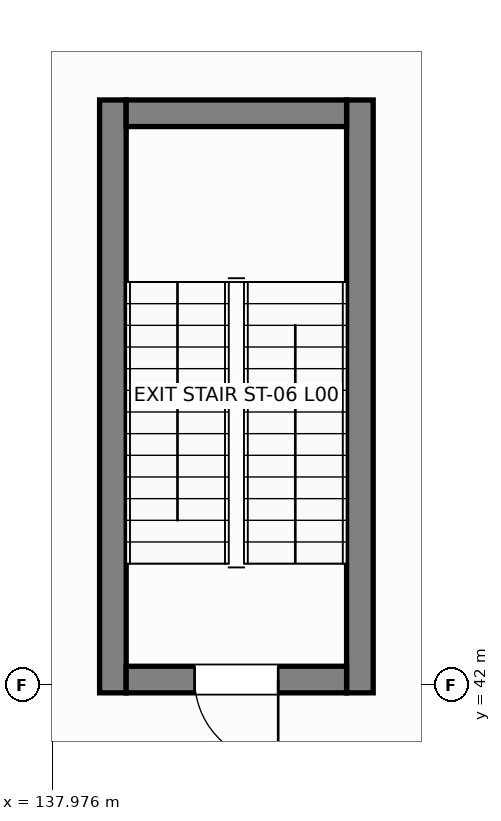
"""IFC4 building model, lengths in metres.
Left out: names, types, materials, properties, quantities, classifications, styles, units other than length and angle.
Written with IfcOpenShell. Run it as: python <this file> out.ifc"""

import sys

from ifc_helpers import new_model, si_unit, direction, frame, frame_2d, origin, place, context, subcontext, project, spatial, rectangle, extrude, element, fill, save


model = new_model("IFC4")
c1 = context("Model", 3, precision=1e-05, world=origin(), true_north=direction((0.0, 1.0)))
c2 = subcontext(c1, "Body", "Model", "MODEL_VIEW")
j1 = project(units=[si_unit("LENGTHUNIT", "METRE"), si_unit("PLANEANGLEUNIT", "RADIAN")], contexts=[c1])
p1 = place(None, origin())
s1 = spatial("IfcSite", under=j1, at=p1, CompositionType="ELEMENT")
p2 = place(p1, origin())
s2 = spatial("IfcBuilding", under=s1, at=p2, CompositionType="ELEMENT")
p3 = place(p2, origin())
s3 = spatial("IfcBuildingStorey", under=s2, at=p3, CompositionType="ELEMENT", Elevation=0.0)
for number, where, z_axis, x_axis in (
    (1, (138.775, 41.9, 0.0), (0.0, 0.0, 1.0), (0.0, 1.0, 0.0)),
    (2, (142.025, 41.9, 0.0), (0.0, 0.0, 1.0), (0.0, 1.0, 0.0)),
):
    element("IfcWall", number, at=place(p3, frame(where, z_axis=z_axis, x_axis=x_axis)), inside=s3, PredefinedType="SHEAR", context=c2, shape_type="SweptSolid", body=[
        extrude(rectangle(XDim=7.8, YDim=0.35, at=frame_2d((3.9, 0.0))), origin(), (0.0, 0.0, 1.0), 4.58),
    ])
p4 = place(p3, frame((138.95, 49.525, 0.0), z_axis=(0.0, 0.0, 1.0), x_axis=(1.0, 0.0, 0.0)))
e3 = element("IfcWall", 3, at=p4, inside=s3, PredefinedType="SHEAR", context=c2, shape_type="SweptSolid", body=[
    extrude(rectangle(XDim=2.9, YDim=0.35, at=frame_2d((1.45, 0.0))), origin(), (0.0, 0.0, 1.0), 4.58),
])
p5 = place(p3, frame((138.95, 42.075, 0.0), z_axis=(0.0, 0.0, 1.0), x_axis=(1.0, 0.0, 0.0)))
e4 = element("IfcWall", 4, at=p5, inside=s3, PredefinedType="SHEAR", context=c2, shape_type="SweptSolid", body=[
    extrude(rectangle(XDim=2.9, YDim=0.35, at=frame_2d((1.45, 0.0))), origin(), (0.0, 0.0, 1.0), 4.58),
])
p6 = place(p5, frame((0.9, 0.0, 0.0)))
e5 = element("IfcOpeningElement", 5, at=p6, cuts=e4, PredefinedType="OPENING", context=c2, shape_type="SweptSolid", body=[
    extrude(rectangle(XDim=1.1, YDim=2.15, at=frame_2d((0.55, 1.075))), frame((0.0, 0.185, 0.0), z_axis=(0.0, -1.0, 0.0), x_axis=(1.0, 0.0, 0.0)), (0.0, 0.0, 1.0), 0.37),
])
p7 = place(p6, frame((1.1, 0.0, 0.0), z_axis=(0.0, 0.0, 1.0), x_axis=(-1.0, 0.0, 0.0)))
e6 = element("IfcDoor", 6, at=p7, inside=s3, OperationType="SINGLE_SWING_LEFT", PredefinedType="DOOR", context=c2, shape_type="SweptSolid", body=[
    extrude(rectangle(XDim=1.1, YDim=2.15, at=frame_2d((0.55, 1.075))), frame((0.0, 0.025, 0.0), z_axis=(0.0, -1.0, 0.0), x_axis=(1.0, 0.0, 0.0)), (0.0, 0.0, 1.0), 0.05),
])
fill(e5, e6)
save(model, sys.argv[1])
